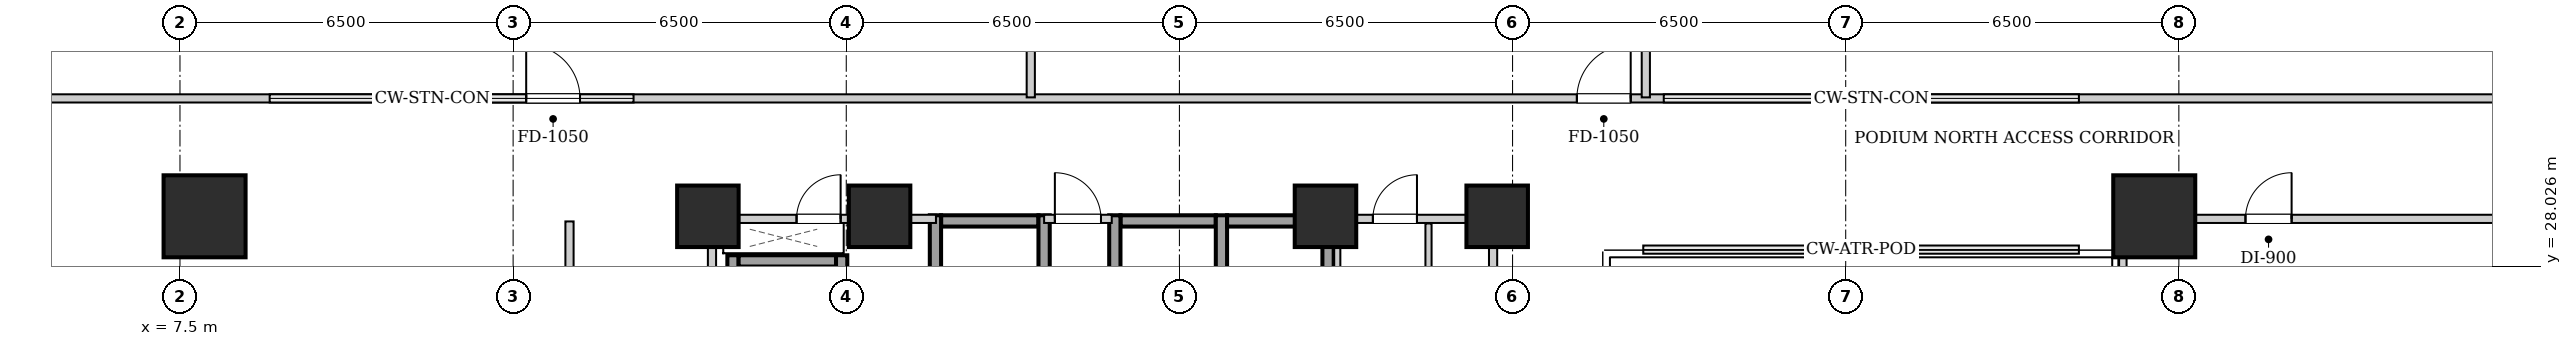
"""IFC4 building model, lengths in metres.
Left out: names, types, materials, properties, quantities, classifications, styles, units other than length and angle.
Written with IfcOpenShell. Run it as: python <this file> out.ifc"""

import sys

from ifc_helpers import new_model, si_unit, direction, frame, frame_2d, origin, origin_2d, place, context, subcontext, project, spatial, rectangle, extrude, element, fill, save


model = new_model("IFC4")
c1 = context("Model", 3, precision=1e-05, world=origin(), true_north=direction((0.0, 1.0)))
c2 = subcontext(c1, "Body", "Model", "MODEL_VIEW")
j1 = project(units=[si_unit("LENGTHUNIT", "METRE"), si_unit("PLANEANGLEUNIT", "RADIAN")], contexts=[c1])
p1 = place(None, origin())
s1 = spatial("IfcSite", under=j1, at=p1, CompositionType="ELEMENT")
p2 = place(p1, origin())
s2 = spatial("IfcBuilding", under=s1, at=p2, CompositionType="ELEMENT")
p3 = place(p2, frame((0.0, 0.0, 11.2)))
s3 = spatial("IfcBuildingStorey", under=s2, at=p3, CompositionType="ELEMENT", Elevation=11.2)
for number, where, z_axis, x_axis in (
    (1, (7.98, 29.0, 0.0), (0.0, 0.0, 1.0), (1.0, 0.0, 0.0)),
    (2, (46.02, 29.0, 0.0), (0.0, 0.0, 1.0), (1.0, 0.0, 0.0)),
):
    element("IfcColumn", number, at=place(p3, frame(where, z_axis=z_axis, x_axis=x_axis)), inside=s3, PredefinedType="COLUMN", context=c2, shape_type="SweptSolid", body=[
        extrude(rectangle(XDim=1.6, YDim=1.6, at=origin_2d()), origin(), (0.0, 0.0, 1.0), 4.8),
    ])
for number, where, z_axis, x_axis in (
    (3, (17.8, 29.0, 0.0), (0.0, 0.0, 1.0), (1.0, 0.0, 0.0)),
    (4, (21.15, 29.0, 0.0), (0.0, 0.0, 1.0), (1.0, 0.0, 0.0)),
    (5, (29.85, 29.0, 0.0), (0.0, 0.0, 1.0), (1.0, 0.0, 0.0)),
    (6, (33.2, 29.0, 0.0), (0.0, 0.0, 1.0), (1.0, 0.0, 0.0)),
):
    element("IfcColumn", number, at=place(p3, frame(where, z_axis=z_axis, x_axis=x_axis)), inside=s3, PredefinedType="COLUMN", context=c2, shape_type="SweptSolid", body=[
        extrude(rectangle(XDim=1.2, YDim=1.2, at=origin_2d()), origin(), (0.0, 0.0, 1.0), 4.8),
    ])
p4 = place(p3, frame((22.35, 28.91, 0.0), z_axis=(0.0, 0.0, 1.0), x_axis=(1.0, 0.0, 0.0)))
e7 = element("IfcWall", 7, at=p4, inside=s3, PredefinedType="SHEAR", context=c2, shape_type="SweptSolid", body=[
    extrude(rectangle(XDim=1.9, YDim=0.22, at=frame_2d((0.95, 0.0))), origin(), (0.0, 0.0, 1.0), 4.48),
])
for number, where, z_axis, x_axis in (
    (8, (22.24, 26.58, 0.0), (0.0, 0.0, 1.0), (0.0, 1.0, 0.0)),
    (9, (24.36, 26.58, 0.0), (0.0, 0.0, 1.0), (0.0, 1.0, 0.0)),
):
    element("IfcWall", number, at=place(p3, frame(where, z_axis=z_axis, x_axis=x_axis)), inside=s3, PredefinedType="SHEAR", context=c2, shape_type="SweptSolid", body=[
        extrude(rectangle(XDim=2.44, YDim=0.22, at=frame_2d((1.22, 0.0))), origin(), (0.0, 0.0, 1.0), 4.48),
    ])
p5 = place(p3, frame((25.85, 28.91, 0.0), z_axis=(0.0, 0.0, 1.0), x_axis=(1.0, 0.0, 0.0)))
e10 = element("IfcWall", 10, at=p5, inside=s3, PredefinedType="SHEAR", context=c2, shape_type="SweptSolid", body=[
    extrude(rectangle(XDim=1.86, YDim=0.22, at=frame_2d((0.93, 0.0))), origin(), (0.0, 0.0, 1.0), 4.48),
])
for number, where, z_axis, x_axis in (
    (11, (25.74, 26.58, 0.0), (0.0, 0.0, 1.0), (0.0, 1.0, 0.0)),
    (12, (27.82, 26.58, 0.0), (0.0, 0.0, 1.0), (0.0, 1.0, 0.0)),
):
    element("IfcWall", number, at=place(p3, frame(where, z_axis=z_axis, x_axis=x_axis)), inside=s3, PredefinedType="SHEAR", context=c2, shape_type="SweptSolid", body=[
        extrude(rectangle(XDim=2.44, YDim=0.22, at=frame_2d((1.22, 0.0))), origin(), (0.0, 0.0, 1.0), 4.48),
    ])
p6 = place(p3, frame((27.93, 28.91, 0.0), z_axis=(0.0, 0.0, 1.0), x_axis=(1.0, 0.0, 0.0)))
e13 = element("IfcWall", 13, at=p6, inside=s3, PredefinedType="SHEAR", context=c2, shape_type="SweptSolid", body=[
    extrude(rectangle(XDim=1.86, YDim=0.22, at=frame_2d((0.93, 0.0))), origin(), (0.0, 0.0, 1.0), 4.48),
])
p7 = place(p3, frame((29.9, 26.58, 0.0), z_axis=(0.0, 0.0, 1.0), x_axis=(0.0, 1.0, 0.0)))
e14 = element("IfcWall", 14, at=p7, inside=s3, PredefinedType="SHEAR", context=c2, shape_type="SweptSolid", body=[
    extrude(rectangle(XDim=2.44, YDim=0.22, at=frame_2d((1.22, 0.0))), origin(), (0.0, 0.0, 1.0), 4.48),
])
p8 = place(p3, frame((18.29, 24.1, 0.0), z_axis=(0.0, 0.0, 1.0), x_axis=(0.0, 1.0, 0.0)))
e15 = element("IfcWall", 15, at=p8, inside=s3, PredefinedType="SHEAR", context=c2, shape_type="SweptSolid", body=[
    extrude(rectangle(XDim=4.14, YDim=0.22, at=frame_2d((2.07, 0.0))), origin(), (0.0, 0.0, 1.0), 4.48),
])
p9 = place(p3, frame((18.4, 28.13, 0.0), z_axis=(0.0, 0.0, 1.0), x_axis=(1.0, 0.0, 0.0)))
e16 = element("IfcWall", 16, at=p9, inside=s3, PredefinedType="SHEAR", context=c2, shape_type="SweptSolid", body=[
    extrude(rectangle(XDim=1.9, YDim=0.22, at=frame_2d((0.95, 0.0))), origin(), (0.0, 0.0, 1.0), 4.48),
])
p10 = place(p3, frame((20.41, 26.06, 0.0), z_axis=(0.0, 0.0, 1.0), x_axis=(0.0, 1.0, 0.0)))
e17 = element("IfcWall", 17, at=p10, inside=s3, PredefinedType="SHEAR", context=c2, shape_type="SweptSolid", body=[
    extrude(rectangle(XDim=2.18, YDim=0.22, at=frame_2d((1.09, 0.0))), origin(), (0.0, 0.0, 1.0), 4.48),
])
for number, where, z_axis, x_axis in (
    (18, (17.88, 24.12, 0.0), (0.0, 0.0, 1.0), (0.0, 1.0, 0.0)),
    (19, (33.12, 24.12, 0.0), (0.0, 0.0, 1.0), (0.0, 1.0, 0.0)),
):
    element("IfcWall", number, at=place(p3, frame(where, z_axis=z_axis, x_axis=x_axis)), inside=s3, PredefinedType="PARTITIONING", context=c2, shape_type="SweptSolid", body=[
        extrude(rectangle(XDim=4.76, YDim=0.16, at=frame_2d((2.38, 0.0))), origin(), (0.0, 0.0, 1.0), 4.48),
    ])
p11 = place(p3, frame((24.36, 28.95, 0.0), z_axis=(0.0, 0.0, 1.0), x_axis=(1.0, 0.0, 0.0)))
e20 = element("IfcWall", 20, at=p11, inside=s3, PredefinedType="PARTITIONING", context=c2, shape_type="SweptSolid", body=[
    extrude(rectangle(XDim=1.32, YDim=0.16, at=frame_2d((0.66, 0.0))), origin(), (0.0, 0.0, 1.0), 4.48),
])
p12 = place(p11, frame((0.21, 0.0, 0.0)))
e21 = element("IfcOpeningElement", 21, at=p12, cuts=e20, PredefinedType="OPENING", context=c2, shape_type="SweptSolid", body=[
    extrude(rectangle(XDim=0.9, YDim=2.05, at=frame_2d((0.45, 1.025))), frame((0.0, 0.09, 0.0), z_axis=(0.0, -1.0, 0.0), x_axis=(1.0, 0.0, 0.0)), (0.0, 0.0, 1.0), 0.18),
])
p13 = place(p3, frame((17.96, 28.95, 0.0), z_axis=(0.0, 0.0, 1.0), x_axis=(1.0, 0.0, 0.0)))
e22 = element("IfcWall", 22, at=p13, inside=s3, PredefinedType="PARTITIONING", context=c2, shape_type="SweptSolid", body=[
    extrude(rectangle(XDim=4.29, YDim=0.16, at=frame_2d((2.145, 0.0))), origin(), (0.0, 0.0, 1.0), 4.48),
])
p14 = place(p13, frame((1.57, 0.0, 0.0)))
e23 = element("IfcOpeningElement", 23, at=p14, cuts=e22, PredefinedType="OPENING", context=c2, shape_type="SweptSolid", body=[
    extrude(rectangle(XDim=0.86, YDim=2.05, at=frame_2d((0.43, 1.025))), frame((0.0, 0.09, 0.0), z_axis=(0.0, -1.0, 0.0), x_axis=(1.0, 0.0, 0.0)), (0.0, 0.0, 1.0), 0.18),
])
p15 = place(p3, frame((30.08, 26.18, 0.0), z_axis=(0.0, 0.0, 1.0), x_axis=(0.0, 1.0, 0.0)))
e24 = element("IfcWall", 24, at=p15, inside=s3, PredefinedType="PARTITIONING", context=c2, shape_type="SweptSolid", body=[
    extrude(rectangle(XDim=2.68, YDim=0.12, at=frame_2d((1.34, 0.0))), origin(), (0.0, 0.0, 1.0), 4.48),
])
p16 = place(p3, frame((31.86, 26.2, 0.0), z_axis=(0.0, 0.0, 1.0), x_axis=(0.0, 1.0, 0.0)))
e25 = element("IfcWall", 25, at=p16, inside=s3, PredefinedType="PARTITIONING", context=c2, shape_type="SweptSolid", body=[
    extrude(rectangle(XDim=2.66, YDim=0.12, at=frame_2d((1.33, 0.0))), origin(), (0.0, 0.0, 1.0), 4.48),
])
p17 = place(p16, frame((0.92, 0.0, 0.0)))
e26 = element("IfcOpeningElement", 26, at=p17, cuts=e25, PredefinedType="OPENING", context=c2, shape_type="SweptSolid", body=[
    extrude(rectangle(XDim=0.86, YDim=2.05, at=frame_2d((0.43, 1.025))), frame((0.0, 0.07, 0.0), z_axis=(0.0, -1.0, 0.0), x_axis=(1.0, 0.0, 0.0)), (0.0, 0.0, 1.0), 0.14),
])
p18 = place(p3, frame((30.08, 28.95, 0.0), z_axis=(0.0, 0.0, 1.0), x_axis=(1.0, 0.0, 0.0)))
e27 = element("IfcWall", 27, at=p18, inside=s3, PredefinedType="PARTITIONING", context=c2, shape_type="SweptSolid", body=[
    extrude(rectangle(XDim=2.96, YDim=0.16, at=frame_2d((1.48, 0.0))), origin(), (0.0, 0.0, 1.0), 4.48),
])
p19 = place(p18, frame((0.695, 0.0, 0.0)))
e28 = element("IfcOpeningElement", 28, at=p19, cuts=e27, PredefinedType="OPENING", context=c2, shape_type="SweptSolid", body=[
    extrude(rectangle(XDim=0.86, YDim=2.05, at=frame_2d((0.43, 1.025))), frame((0.0, 0.09, 0.0), z_axis=(0.0, -1.0, 0.0), x_axis=(1.0, 0.0, 0.0)), (0.0, 0.0, 1.0), 0.18),
])
p20 = place(p3, frame((0.28, 31.3, 0.0), z_axis=(0.0, 0.0, 1.0), x_axis=(1.0, 0.0, 0.0)))
e29 = element("IfcWall", 29, at=p20, inside=s3, PredefinedType="PARTITIONING", context=c2, shape_type="SweptSolid", body=[
    extrude(rectangle(XDim=53.44, YDim=0.16, at=frame_2d((26.72, 0.0))), origin(), (0.0, 0.0, 1.0), 4.48),
])
p21 = place(p20, frame((13.975, 0.0, 0.0)))
e30 = element("IfcOpeningElement", 30, at=p21, cuts=e29, PredefinedType="OPENING", context=c2, shape_type="SweptSolid", body=[
    extrude(rectangle(XDim=1.05, YDim=2.05, at=frame_2d((0.525, 1.025))), frame((0.0, 0.09, 0.0), z_axis=(0.0, -1.0, 0.0), x_axis=(1.0, 0.0, 0.0)), (0.0, 0.0, 1.0), 0.18),
])
p22 = place(p20, frame((34.475, 0.0, 0.0)))
e31 = element("IfcOpeningElement", 31, at=p22, cuts=e29, PredefinedType="OPENING", context=c2, shape_type="SweptSolid", body=[
    extrude(rectangle(XDim=1.05, YDim=2.05, at=frame_2d((0.525, 1.025))), frame((0.0, 0.09, 0.0), z_axis=(0.0, -1.0, 0.0), x_axis=(1.0, 0.0, 0.0)), (0.0, 0.0, 1.0), 0.18),
])
p23 = place(p3, frame((15.1, 15.1, 0.0), z_axis=(0.0, 0.0, 1.0), x_axis=(0.0, 1.0, 0.0)))
e32 = element("IfcWall", 32, at=p23, inside=s3, PredefinedType="PARTITIONING", context=c2, shape_type="SweptSolid", body=[
    extrude(rectangle(XDim=13.8, YDim=0.16, at=frame_2d((6.9, 0.0))), origin(), (0.0, 0.0, 1.0), 4.48),
])
p24 = place(p23, frame((6.475, 0.0, 0.0)))
e33 = element("IfcOpeningElement", 33, at=p24, cuts=e32, PredefinedType="OPENING", context=c2, shape_type="SweptSolid", body=[
    extrude(rectangle(XDim=1.05, YDim=2.05, at=frame_2d((0.525, 1.025))), frame((0.0, 0.09, 0.0), z_axis=(0.0, -1.0, 0.0), x_axis=(1.0, 0.0, 0.0)), (0.0, 0.0, 1.0), 0.18),
])
p25 = place(p3, frame((45.4, 28.95, 0.0), z_axis=(0.0, 0.0, 1.0), x_axis=(1.0, 0.0, 0.0)))
e34 = element("IfcWall", 34, at=p25, inside=s3, PredefinedType="PARTITIONING", context=c2, shape_type="SweptSolid", body=[
    extrude(rectangle(XDim=8.32, YDim=0.16, at=frame_2d((4.16, 0.0))), origin(), (0.0, 0.0, 1.0), 3.565),
])
p26 = place(p25, frame((2.4, 0.0, 0.0)))
e35 = element("IfcOpeningElement", 35, at=p26, cuts=e34, PredefinedType="OPENING", context=c2, shape_type="SweptSolid", body=[
    extrude(rectangle(XDim=0.9, YDim=2.05, at=frame_2d((0.45, 1.025))), frame((0.0, 0.09, 0.0), z_axis=(0.0, -1.0, 0.0), x_axis=(1.0, 0.0, 0.0)), (0.0, 0.0, 1.0), 0.18),
])
p27 = place(p3, frame((45.4, 15.1, 0.0), z_axis=(0.0, 0.0, 1.0), x_axis=(0.0, 1.0, 0.0)))
e36 = element("IfcWall", 36, at=p27, inside=s3, PredefinedType="PARTITIONING", context=c2, shape_type="SweptSolid", body=[
    extrude(rectangle(XDim=13.78, YDim=0.16, at=frame_2d((6.89, 0.0))), origin(), (0.0, 0.0, 1.0), 4.48),
])
p28 = place(p3, frame((24.1, 31.32, 0.0), z_axis=(0.0, 0.0, 1.0), x_axis=(0.0, 1.0, 0.0)))
e37 = element("IfcWall", 37, at=p28, inside=s3, PredefinedType="PARTITIONING", context=c2, shape_type="SweptSolid", body=[
    extrude(rectangle(XDim=16.0, YDim=0.16, at=frame_2d((8.0, 0.0))), origin(), (0.0, 0.0, 1.0), 4.48),
])
p29 = place(p28, frame((4.55, 0.0, 0.0)))
e38 = element("IfcOpeningElement", 38, at=p29, cuts=e37, PredefinedType="OPENING", context=c2, shape_type="SweptSolid", body=[
    extrude(rectangle(XDim=0.9, YDim=2.05, at=frame_2d((0.45, 1.025))), frame((0.0, 0.09, 0.0), z_axis=(0.0, -1.0, 0.0), x_axis=(1.0, 0.0, 0.0)), (0.0, 0.0, 1.0), 0.18),
])
p30 = place(p3, frame((36.1, 31.32, 0.0), z_axis=(0.0, 0.0, 1.0), x_axis=(0.0, 1.0, 0.0)))
e39 = element("IfcWall", 39, at=p30, inside=s3, PredefinedType="PARTITIONING", context=c2, shape_type="SweptSolid", body=[
    extrude(rectangle(XDim=16.0, YDim=0.16, at=frame_2d((8.0, 0.0))), origin(), (0.0, 0.0, 1.0), 4.48),
])
p31 = place(p30, frame((4.55, 0.0, 0.0)))
e40 = element("IfcOpeningElement", 40, at=p31, cuts=e39, PredefinedType="OPENING", context=c2, shape_type="SweptSolid", body=[
    extrude(rectangle(XDim=0.9, YDim=2.05, at=frame_2d((0.45, 1.025))), frame((0.0, 0.09, 0.0), z_axis=(0.0, -1.0, 0.0), x_axis=(1.0, 0.0, 0.0)), (0.0, 0.0, 1.0), 0.18),
])
p32 = place(p12, origin())
e41 = element("IfcDoor", 41, at=p32, inside=s3, OperationType="SINGLE_SWING_LEFT", PredefinedType="DOOR", context=c2, shape_type="SweptSolid", body=[
    extrude(rectangle(XDim=0.9, YDim=2.05, at=frame_2d((0.45, 1.025))), frame((0.0, 0.025, 0.0), z_axis=(0.0, -1.0, 0.0), x_axis=(1.0, 0.0, 0.0)), (0.0, 0.0, 1.0), 0.05),
])
fill(e21, e41)
p33 = place(p14, origin())
e42 = element("IfcDoor", 42, at=p33, inside=s3, OperationType="SINGLE_SWING_RIGHT", PredefinedType="DOOR", context=c2, shape_type="SweptSolid", body=[
    extrude(rectangle(XDim=0.86, YDim=2.05, at=frame_2d((0.43, 1.025))), frame((0.0, 0.025, 0.0), z_axis=(0.0, -1.0, 0.0), x_axis=(1.0, 0.0, 0.0)), (0.0, 0.0, 1.0), 0.05),
])
fill(e23, e42)
p34 = place(p19, origin())
e43 = element("IfcDoor", 43, at=p34, inside=s3, OperationType="SINGLE_SWING_RIGHT", PredefinedType="DOOR", context=c2, shape_type="SweptSolid", body=[
    extrude(rectangle(XDim=0.86, YDim=2.05, at=frame_2d((0.43, 1.025))), frame((0.0, 0.025, 0.0), z_axis=(0.0, -1.0, 0.0), x_axis=(1.0, 0.0, 0.0)), (0.0, 0.0, 1.0), 0.05),
])
fill(e28, e43)
p35 = place(p21, origin())
e44 = element("IfcDoor", 44, at=p35, inside=s3, OperationType="SINGLE_SWING_LEFT", PredefinedType="DOOR", context=c2, shape_type="SweptSolid", body=[
    extrude(rectangle(XDim=1.05, YDim=2.05, at=frame_2d((0.525, 1.025))), frame((0.0, 0.025, 0.0), z_axis=(0.0, -1.0, 0.0), x_axis=(1.0, 0.0, 0.0)), (0.0, 0.0, 1.0), 0.05),
])
fill(e30, e44)
p36 = place(p22, origin())
e45 = element("IfcDoor", 45, at=p36, inside=s3, OperationType="SINGLE_SWING_RIGHT", PredefinedType="DOOR", context=c2, shape_type="SweptSolid", body=[
    extrude(rectangle(XDim=1.05, YDim=2.05, at=frame_2d((0.525, 1.025))), frame((0.0, 0.025, 0.0), z_axis=(0.0, -1.0, 0.0), x_axis=(1.0, 0.0, 0.0)), (0.0, 0.0, 1.0), 0.05),
])
fill(e31, e45)
p37 = place(p26, origin())
e46 = element("IfcDoor", 46, at=p37, inside=s3, OperationType="SINGLE_SWING_RIGHT", PredefinedType="DOOR", context=c2, shape_type="SweptSolid", body=[
    extrude(rectangle(XDim=0.9, YDim=2.05, at=frame_2d((0.45, 1.025))), frame((0.0, 0.025, 0.0), z_axis=(0.0, -1.0, 0.0), x_axis=(1.0, 0.0, 0.0)), (0.0, 0.0, 1.0), 0.05),
])
fill(e35, e46)
save(model, sys.argv[1])
